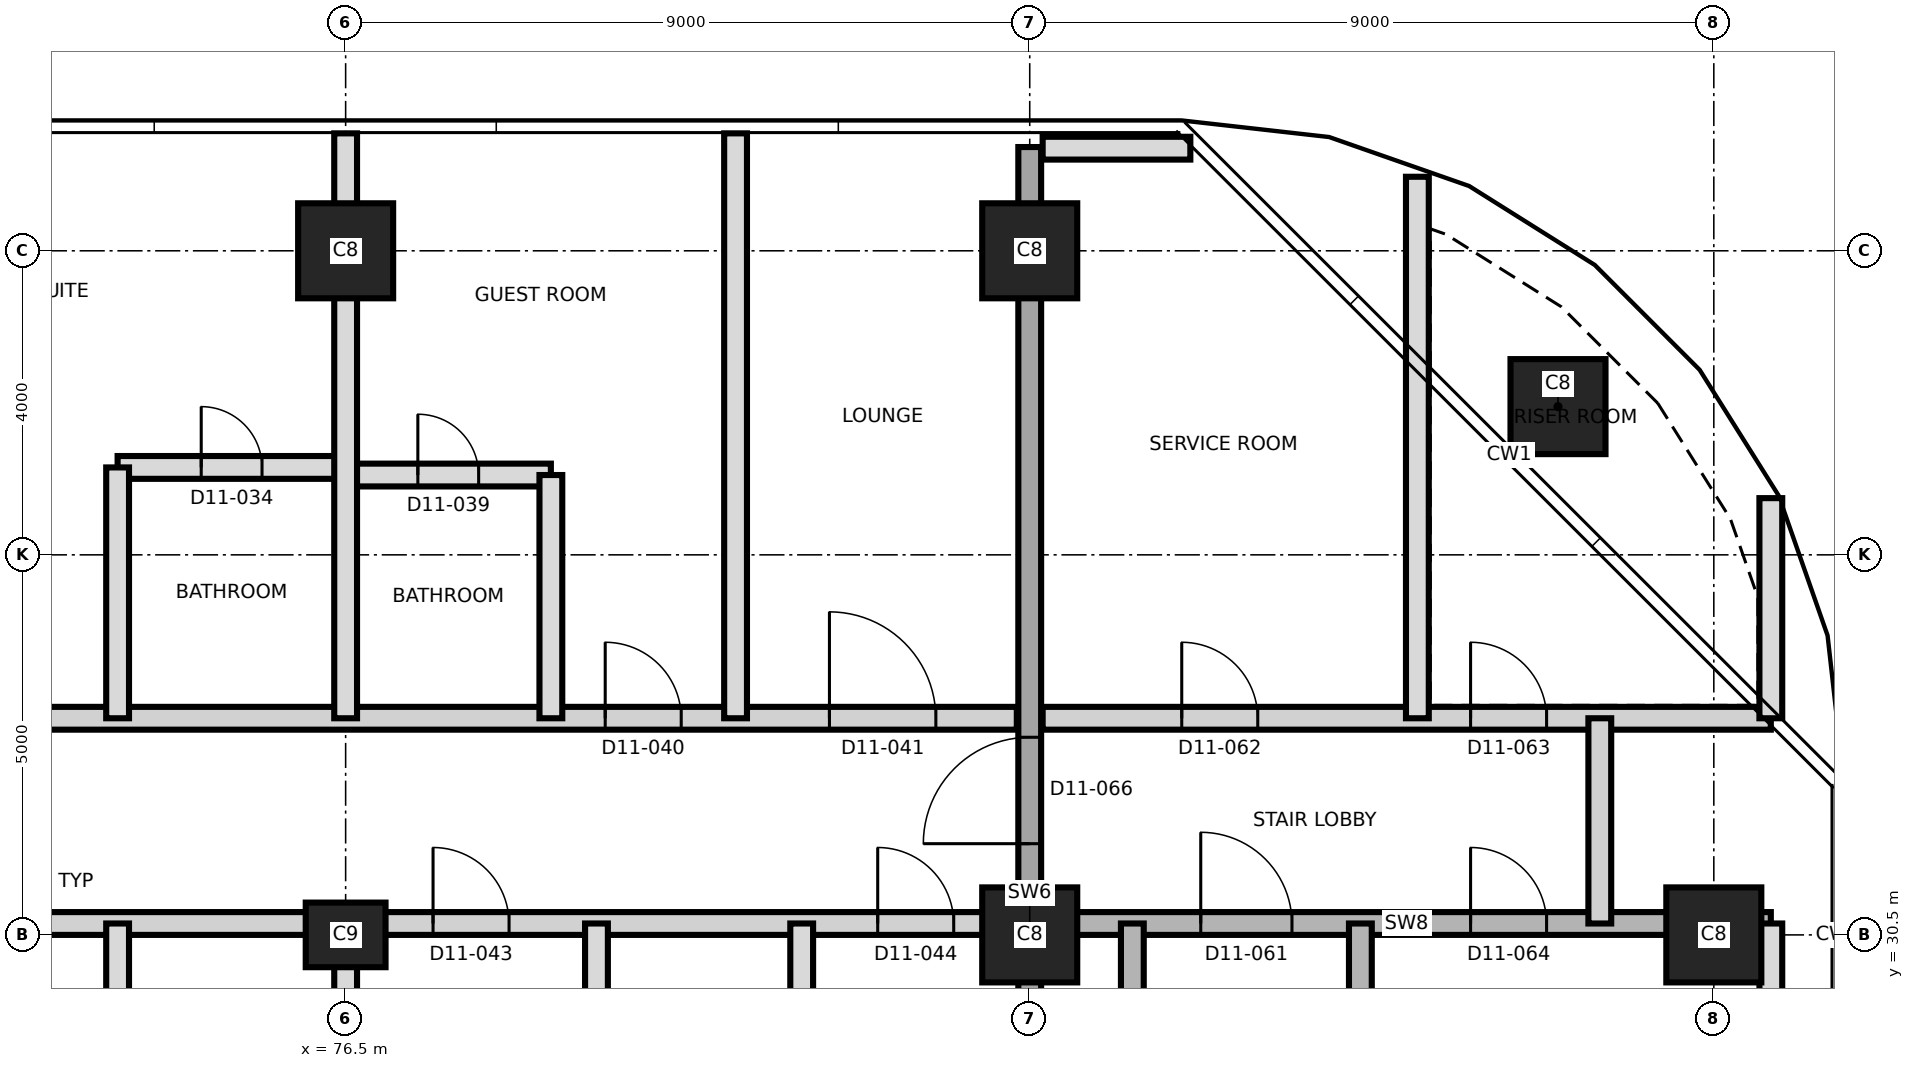
"""IFC4 building model, lengths in metres.
Left out: names, types, materials, properties, quantities, classifications, styles, units other than length and angle.
Written with IfcOpenShell. Run it as: python <this file> out.ifc"""

import sys

from ifc_helpers import new_model, si_unit, direction, frame, frame_2d, origin, origin_2d, place, context, subcontext, project, spatial, rectangle, extrude, element, fill, save


model = new_model("IFC4")
c1 = context("Model", 3, precision=1e-05, world=origin(), true_north=direction((0.0, 1.0)))
c2 = subcontext(c1, "Body", "Model", "MODEL_VIEW")
j1 = project(units=[si_unit("LENGTHUNIT", "METRE"), si_unit("PLANEANGLEUNIT", "RADIAN")], contexts=[c1])
p1 = place(None, origin())
s1 = spatial("IfcSite", under=j1, at=p1, CompositionType="ELEMENT")
p2 = place(p1, origin())
s2 = spatial("IfcBuilding", under=s1, at=p2, CompositionType="ELEMENT")
p3 = place(p2, frame((0.0, 0.0, 131.5)))
s3 = spatial("IfcBuildingStorey", under=s2, at=p3, CompositionType="ELEMENT", Elevation=131.5)
p4 = place(p3, frame((76.5, 30.5, 0.0), z_axis=(0.0, 0.0, 1.0), x_axis=(1.0, 0.0, 0.0)))
e1 = element("IfcColumn", 1, at=p4, inside=s3, PredefinedType="COLUMN", context=c2, shape_type="SweptSolid", body=[
    extrude(rectangle(XDim=1.05, YDim=0.85, at=origin_2d()), origin(), (0.0, 0.0, 1.0), 3.7),
])
for number, where, z_axis, x_axis in (
    (2, (85.5, 30.5, 0.0), (0.0, 0.0, 1.0), (1.0, 0.0, 0.0)),
    (3, (94.5, 30.5, 0.0), (0.0, 0.0, 1.0), (1.0, 0.0, 0.0)),
    (4, (92.45, 37.45, 0.0), (0.0, 0.0, 1.0), (1.0, 0.0, 0.0)),
    (5, (76.5, 39.5, 0.0), (0.0, 0.0, 1.0), (1.0, 0.0, 0.0)),
    (6, (85.5, 39.5, 0.0), (0.0, 0.0, 1.0), (1.0, 0.0, 0.0)),
):
    element("IfcColumn", number, at=place(p3, frame(where, z_axis=z_axis, x_axis=x_axis)), inside=s3, PredefinedType="COLUMN", context=c2, shape_type="SweptSolid", body=[
        extrude(rectangle(XDim=1.25, YDim=1.25, at=origin_2d()), origin(), (0.0, 0.0, 1.0), 3.7),
    ])
p5 = place(p3, frame((85.5, 20.135, 0.0), z_axis=(0.0, 0.0, 1.0), x_axis=(0.0, 1.0, 0.0)))
e7 = element("IfcWall", 7, at=p5, inside=s3, PredefinedType="SHEAR", context=c2, shape_type="SweptSolid", body=[
    extrude(rectangle(XDim=20.73, YDim=0.3, at=frame_2d((10.365, 0.0))), origin(), (0.0, 0.0, 1.0), 3.7),
])
p6 = place(p5, frame((11.565, 0.0, 0.0)))
e8 = element("IfcOpeningElement", 8, at=p6, cuts=e7, PredefinedType="OPENING", context=c2, shape_type="SweptSolid", body=[
    extrude(rectangle(XDim=1.4, YDim=2.1, at=frame_2d((0.7, 1.05))), frame((0.0, 0.16, 0.0), z_axis=(0.0, -1.0, 0.0), x_axis=(1.0, 0.0, 0.0)), (0.0, 0.0, 1.0), 0.32),
])
p7 = place(p3, frame((58.8, 30.65, 0.0), z_axis=(0.0, 0.0, 1.0), x_axis=(1.0, 0.0, 0.0)))
e9 = element("IfcWall", 9, at=p7, inside=s3, PredefinedType="PARTITIONING", context=c2, shape_type="SweptSolid", body=[
    extrude(rectangle(XDim=26.53, YDim=0.3, at=frame_2d((13.265, 0.0))), origin(), (0.0, 0.0, 1.0), 3.4),
])
p8 = place(p7, frame((3.115, 0.0, 0.0)))
e10 = element("IfcOpeningElement", 10, at=p8, cuts=e9, PredefinedType="OPENING", context=c2, shape_type="SweptSolid", body=[
    extrude(rectangle(XDim=1.0, YDim=2.1, at=frame_2d((0.5, 1.05))), frame((0.0, 0.16, 0.0), z_axis=(0.0, -1.0, 0.0), x_axis=(1.0, 0.0, 0.0)), (0.0, 0.0, 1.0), 0.32),
])
p9 = place(p7, frame((6.065, 0.0, 0.0)))
e11 = element("IfcOpeningElement", 11, at=p9, cuts=e9, PredefinedType="OPENING", context=c2, shape_type="SweptSolid", body=[
    extrude(rectangle(XDim=1.4, YDim=2.1, at=frame_2d((0.7, 1.05))), frame((0.0, 0.16, 0.0), z_axis=(0.0, -1.0, 0.0), x_axis=(1.0, 0.0, 0.0)), (0.0, 0.0, 1.0), 0.32),
])
p10 = place(p7, frame((12.7, 0.0, 0.0)))
e12 = element("IfcOpeningElement", 12, at=p10, cuts=e9, PredefinedType="OPENING", context=c2, shape_type="SweptSolid", body=[
    extrude(rectangle(XDim=1.0, YDim=2.4, at=frame_2d((0.5, 1.2))), frame((0.0, 0.16, 0.0), z_axis=(0.0, -1.0, 0.0), x_axis=(1.0, 0.0, 0.0)), (0.0, 0.0, 1.0), 0.32),
])
p11 = place(p7, frame((18.85, 0.0, 0.0)))
e13 = element("IfcOpeningElement", 13, at=p11, cuts=e9, PredefinedType="OPENING", context=c2, shape_type="SweptSolid", body=[
    extrude(rectangle(XDim=1.0, YDim=2.1, at=frame_2d((0.5, 1.05))), frame((0.0, 0.16, 0.0), z_axis=(0.0, -1.0, 0.0), x_axis=(1.0, 0.0, 0.0)), (0.0, 0.0, 1.0), 0.32),
])
p12 = place(p7, frame((24.7, 0.0, 0.0)))
e14 = element("IfcOpeningElement", 14, at=p12, cuts=e9, PredefinedType="OPENING", context=c2, shape_type="SweptSolid", body=[
    extrude(rectangle(XDim=1.0, YDim=2.1, at=frame_2d((0.5, 1.05))), frame((0.0, 0.16, 0.0), z_axis=(0.0, -1.0, 0.0), x_axis=(1.0, 0.0, 0.0)), (0.0, 0.0, 1.0), 0.32),
])
p13 = place(p3, frame((85.67, 30.65, 0.0), z_axis=(0.0, 0.0, 1.0), x_axis=(1.0, 0.0, 0.0)))
e15 = element("IfcWall", 15, at=p13, inside=s3, PredefinedType="SHEAR", context=c2, shape_type="SweptSolid", body=[
    extrude(rectangle(XDim=9.58, YDim=0.3, at=frame_2d((4.79, 0.0))), origin(), (0.0, 0.0, 1.0), 3.4),
])
p14 = place(p13, frame((2.08, 0.0, 0.0)))
e16 = element("IfcOpeningElement", 16, at=p14, cuts=e15, PredefinedType="OPENING", context=c2, shape_type="SweptSolid", body=[
    extrude(rectangle(XDim=1.2, YDim=2.1, at=frame_2d((0.6, 1.05))), frame((0.0, 0.16, 0.0), z_axis=(0.0, -1.0, 0.0), x_axis=(1.0, 0.0, 0.0)), (0.0, 0.0, 1.0), 0.32),
])
p15 = place(p13, frame((5.63, 0.0, 0.0)))
e17 = element("IfcOpeningElement", 17, at=p15, cuts=e15, PredefinedType="OPENING", context=c2, shape_type="SweptSolid", body=[
    extrude(rectangle(XDim=1.0, YDim=2.1, at=frame_2d((0.5, 1.05))), frame((0.0, 0.16, 0.0), z_axis=(0.0, -1.0, 0.0), x_axis=(1.0, 0.0, 0.0)), (0.0, 0.0, 1.0), 0.32),
])
p16 = place(p3, frame((58.8, 33.35, 0.0), z_axis=(0.0, 0.0, 1.0), x_axis=(1.0, 0.0, 0.0)))
e18 = element("IfcWall", 18, at=p16, inside=s3, PredefinedType="PARTITIONING", context=c2, shape_type="SweptSolid", body=[
    extrude(rectangle(XDim=26.53, YDim=0.3, at=frame_2d((13.265, 0.0))), origin(), (0.0, 0.0, 1.0), 3.4),
])
p17 = place(p16, frame((0.835, 0.0, 0.0)))
e19 = element("IfcOpeningElement", 19, at=p17, cuts=e18, PredefinedType="OPENING", context=c2, shape_type="SweptSolid", body=[
    extrude(rectangle(XDim=1.2, YDim=2.1, at=frame_2d((0.6, 1.05))), frame((0.0, 0.16, 0.0), z_axis=(0.0, -1.0, 0.0), x_axis=(1.0, 0.0, 0.0)), (0.0, 0.0, 1.0), 0.32),
])
p18 = place(p16, frame((4.085, 0.0, 0.0)))
e20 = element("IfcOpeningElement", 20, at=p18, cuts=e18, PredefinedType="OPENING", context=c2, shape_type="SweptSolid", body=[
    extrude(rectangle(XDim=1.0, YDim=2.1, at=frame_2d((0.5, 1.05))), frame((0.0, 0.16, 0.0), z_axis=(0.0, -1.0, 0.0), x_axis=(1.0, 0.0, 0.0)), (0.0, 0.0, 1.0), 0.32),
])
p19 = place(p16, frame((12.7, 0.0, 0.0)))
e21 = element("IfcOpeningElement", 21, at=p19, cuts=e18, PredefinedType="OPENING", context=c2, shape_type="SweptSolid", body=[
    extrude(rectangle(XDim=1.0, YDim=2.4, at=frame_2d((0.5, 1.2))), frame((0.0, 0.16, 0.0), z_axis=(0.0, -1.0, 0.0), x_axis=(1.0, 0.0, 0.0)), (0.0, 0.0, 1.0), 0.32),
])
p20 = place(p16, frame((21.115, 0.0, 0.0)))
e22 = element("IfcOpeningElement", 22, at=p20, cuts=e18, PredefinedType="OPENING", context=c2, shape_type="SweptSolid", body=[
    extrude(rectangle(XDim=1.0, YDim=2.1, at=frame_2d((0.5, 1.05))), frame((0.0, 0.16, 0.0), z_axis=(0.0, -1.0, 0.0), x_axis=(1.0, 0.0, 0.0)), (0.0, 0.0, 1.0), 0.32),
])
p21 = place(p16, frame((24.065, 0.0, 0.0)))
e23 = element("IfcOpeningElement", 23, at=p21, cuts=e18, PredefinedType="OPENING", context=c2, shape_type="SweptSolid", body=[
    extrude(rectangle(XDim=1.4, YDim=2.1, at=frame_2d((0.7, 1.05))), frame((0.0, 0.16, 0.0), z_axis=(0.0, -1.0, 0.0), x_axis=(1.0, 0.0, 0.0)), (0.0, 0.0, 1.0), 0.32),
])
p22 = place(p3, frame((85.67, 33.35, 0.0), z_axis=(0.0, 0.0, 1.0), x_axis=(1.0, 0.0, 0.0)))
e24 = element("IfcWall", 24, at=p22, inside=s3, PredefinedType="PARTITIONING", context=c2, shape_type="SweptSolid", body=[
    extrude(rectangle(XDim=9.58, YDim=0.3, at=frame_2d((4.79, 0.0))), origin(), (0.0, 0.0, 1.0), 3.4),
])
p23 = place(p22, frame((1.83, 0.0, 0.0)))
e25 = element("IfcOpeningElement", 25, at=p23, cuts=e24, PredefinedType="OPENING", context=c2, shape_type="SweptSolid", body=[
    extrude(rectangle(XDim=1.0, YDim=2.1, at=frame_2d((0.5, 1.05))), frame((0.0, 0.16, 0.0), z_axis=(0.0, -1.0, 0.0), x_axis=(1.0, 0.0, 0.0)), (0.0, 0.0, 1.0), 0.32),
])
p24 = place(p22, frame((5.63, 0.0, 0.0)))
e26 = element("IfcOpeningElement", 26, at=p24, cuts=e24, PredefinedType="OPENING", context=c2, shape_type="SweptSolid", body=[
    extrude(rectangle(XDim=1.0, YDim=2.1, at=frame_2d((0.5, 1.05))), frame((0.0, 0.16, 0.0), z_axis=(0.0, -1.0, 0.0), x_axis=(1.0, 0.0, 0.0)), (0.0, 0.0, 1.0), 0.32),
])
p25 = place(p3, frame((76.5, 36.55, 0.0), z_axis=(0.0, 0.0, 1.0), x_axis=(1.0, 0.0, 0.0)))
e27 = element("IfcWall", 27, at=p25, inside=s3, PredefinedType="PARTITIONING", context=c2, shape_type="SweptSolid", body=[
    extrude(rectangle(XDim=2.7, YDim=0.3, at=frame_2d((1.35, 0.0))), origin(), (0.0, 0.0, 1.0), 3.4),
])
p26 = place(p25, frame((0.95, 0.0, 0.0)))
e28 = element("IfcOpeningElement", 28, at=p26, cuts=e27, PredefinedType="OPENING", context=c2, shape_type="SweptSolid", body=[
    extrude(rectangle(XDim=0.8, YDim=2.1, at=frame_2d((0.4, 1.05))), frame((0.0, 0.16, 0.0), z_axis=(0.0, -1.0, 0.0), x_axis=(1.0, 0.0, 0.0)), (0.0, 0.0, 1.0), 0.32),
])
p27 = place(p3, frame((73.5, 36.65, 0.0), z_axis=(0.0, 0.0, 1.0), x_axis=(1.0, 0.0, 0.0)))
e29 = element("IfcWall", 29, at=p27, inside=s3, PredefinedType="PARTITIONING", context=c2, shape_type="SweptSolid", body=[
    extrude(rectangle(XDim=3.0, YDim=0.3, at=frame_2d((1.5, 0.0))), origin(), (0.0, 0.0, 1.0), 3.4),
])
p28 = place(p27, frame((1.1, 0.0, 0.0)))
e30 = element("IfcOpeningElement", 30, at=p28, cuts=e29, PredefinedType="OPENING", context=c2, shape_type="SweptSolid", body=[
    extrude(rectangle(XDim=0.8, YDim=2.1, at=frame_2d((0.4, 1.05))), frame((0.0, 0.16, 0.0), z_axis=(0.0, -1.0, 0.0), x_axis=(1.0, 0.0, 0.0)), (0.0, 0.0, 1.0), 0.32),
])
p29 = place(p3, frame((85.67, 40.85, 0.0), z_axis=(0.0, 0.0, 1.0), x_axis=(1.0, 0.0, 0.0)))
e31 = element("IfcWall", 31, at=p29, inside=s3, PredefinedType="PARTITIONING", context=c2, shape_type="SweptSolid", body=[
    extrude(rectangle(XDim=1.943, YDim=0.3, at=frame_2d((0.972, 0.0))), origin(), (0.0, 0.0, 1.0), 3.35),
])
for number, where, z_axis, x_axis in (
    (32, (73.5, 27.35, 0.0), (0.0, 0.0, 1.0), (0.0, 1.0, 0.0)),
    (33, (73.5, 33.35, 0.0), (0.0, 0.0, 1.0), (0.0, 1.0, 0.0)),
):
    element("IfcWall", number, at=place(p3, frame(where, z_axis=z_axis, x_axis=x_axis)), inside=s3, PredefinedType="PARTITIONING", context=c2, shape_type="SweptSolid", body=[
        extrude(rectangle(XDim=3.3, YDim=0.3, at=frame_2d((1.65, 0.0))), origin(), (0.0, 0.0, 1.0), 3.4),
    ])
p30 = place(p3, frame((76.5, 20.135, 0.0), z_axis=(0.0, 0.0, 1.0), x_axis=(0.0, 1.0, 0.0)))
e34 = element("IfcWall", 34, at=p30, inside=s3, PredefinedType="PARTITIONING", context=c2, shape_type="SweptSolid", body=[
    extrude(rectangle(XDim=10.515, YDim=0.3, at=frame_2d((5.257, 0.0))), origin(), (0.0, 0.0, 1.0), 3.35),
])
p31 = place(p3, frame((76.5, 33.35, 0.0), z_axis=(0.0, 0.0, 1.0), x_axis=(0.0, 1.0, 0.0)))
e35 = element("IfcWall", 35, at=p31, inside=s3, PredefinedType="PARTITIONING", context=c2, shape_type="SweptSolid", body=[
    extrude(rectangle(XDim=7.695, YDim=0.3, at=frame_2d((3.847, 0.0))), origin(), (0.0, 0.0, 1.0), 3.35),
])
for number, where, z_axis, x_axis in (
    (36, (79.2, 33.35, 0.0), (0.0, 0.0, 1.0), (0.0, 1.0, 0.0)),
    (37, (79.8, 27.45, 0.0), (0.0, 0.0, 1.0), (0.0, 1.0, 0.0)),
):
    element("IfcWall", number, at=place(p3, frame(where, z_axis=z_axis, x_axis=x_axis)), inside=s3, PredefinedType="PARTITIONING", context=c2, shape_type="SweptSolid", body=[
        extrude(rectangle(XDim=3.2, YDim=0.3, at=frame_2d((1.6, 0.0))), origin(), (0.0, 0.0, 1.0), 3.4),
    ])
p32 = place(p3, frame((81.63, 33.35, 0.0), z_axis=(0.0, 0.0, 1.0), x_axis=(0.0, 1.0, 0.0)))
e38 = element("IfcWall", 38, at=p32, inside=s3, PredefinedType="PARTITIONING", context=c2, shape_type="SweptSolid", body=[
    extrude(rectangle(XDim=7.695, YDim=0.3, at=frame_2d((3.847, 0.0))), origin(), (0.0, 0.0, 1.0), 3.35),
])
p33 = place(p3, frame((82.5, 20.135, 0.0), z_axis=(0.0, 0.0, 1.0), x_axis=(0.0, 1.0, 0.0)))
e39 = element("IfcWall", 39, at=p33, inside=s3, PredefinedType="PARTITIONING", context=c2, shape_type="SweptSolid", body=[
    extrude(rectangle(XDim=10.515, YDim=0.3, at=frame_2d((5.257, 0.0))), origin(), (0.0, 0.0, 1.0), 3.35),
])
for number, where, z_axis, x_axis in (
    (40, (86.85, 21.8, 0.0), (0.0, 0.0, 1.0), (0.0, 1.0, 0.0)),
    (41, (89.85, 21.8, 0.0), (0.0, 0.0, 1.0), (0.0, 1.0, 0.0)),
):
    element("IfcWall", number, at=place(p3, frame(where, z_axis=z_axis, x_axis=x_axis)), inside=s3, PredefinedType="SHEAR", context=c2, shape_type="SweptSolid", body=[
        extrude(rectangle(XDim=8.85, YDim=0.3, at=frame_2d((4.425, 0.0))), origin(), (0.0, 0.0, 1.0), 3.4),
    ])
p34 = place(p3, frame((90.6, 33.35, 0.0), z_axis=(0.0, 0.0, 1.0), x_axis=(0.0, 1.0, 0.0)))
e42 = element("IfcWall", 42, at=p34, inside=s3, PredefinedType="PARTITIONING", context=c2, shape_type="SweptSolid", body=[
    extrude(rectangle(XDim=7.124, YDim=0.3, at=frame_2d((3.562, 0.0))), origin(), (0.0, 0.0, 1.0), 3.35),
])
p35 = place(p3, frame((93.0, 30.65, 0.0), z_axis=(0.0, 0.0, 1.0), x_axis=(0.0, 1.0, 0.0)))
e43 = element("IfcWall", 43, at=p35, inside=s3, PredefinedType="PARTITIONING", context=c2, shape_type="SweptSolid", body=[
    extrude(rectangle(XDim=2.7, YDim=0.3, at=frame_2d((1.35, 0.0))), origin(), (0.0, 0.0, 1.0), 3.4),
])
p36 = place(p3, frame((95.25, 24.754, 0.0), z_axis=(0.0, 0.0, 1.0), x_axis=(0.0, 1.0, 0.0)))
e44 = element("IfcWall", 44, at=p36, inside=s3, PredefinedType="PARTITIONING", context=c2, shape_type="SweptSolid", body=[
    extrude(rectangle(XDim=5.896, YDim=0.3, at=frame_2d((2.948, 0.0))), origin(), (0.0, 0.0, 1.0), 3.35),
])
p37 = place(p3, frame((95.25, 33.35, 0.0), z_axis=(0.0, 0.0, 1.0), x_axis=(0.0, 1.0, 0.0)))
e45 = element("IfcWall", 45, at=p37, inside=s3, PredefinedType="PARTITIONING", context=c2, shape_type="SweptSolid", body=[
    extrude(rectangle(XDim=2.896, YDim=0.3, at=frame_2d((1.448, 0.0))), origin(), (0.0, 0.0, 1.0), 3.35),
])
p38 = place(p28, origin())
e46 = element("IfcDoor", 46, at=p38, inside=s3, OperationType="SINGLE_SWING_RIGHT", PredefinedType="DOOR", context=c2, shape_type="SweptSolid", body=[
    extrude(rectangle(XDim=0.8, YDim=2.1, at=frame_2d((0.4, 1.05))), frame((0.0, 0.025, 0.0), z_axis=(0.0, -1.0, 0.0), x_axis=(1.0, 0.0, 0.0)), (0.0, 0.0, 1.0), 0.05),
])
fill(e30, e46)
p39 = place(p26, origin())
e47 = element("IfcDoor", 47, at=p39, inside=s3, OperationType="SINGLE_SWING_LEFT", PredefinedType="DOOR", context=c2, shape_type="SweptSolid", body=[
    extrude(rectangle(XDim=0.8, YDim=2.1, at=frame_2d((0.4, 1.05))), frame((0.0, 0.025, 0.0), z_axis=(0.0, -1.0, 0.0), x_axis=(1.0, 0.0, 0.0)), (0.0, 0.0, 1.0), 0.05),
])
fill(e28, e47)
p40 = place(p20, origin())
e48 = element("IfcDoor", 48, at=p40, inside=s3, OperationType="SINGLE_SWING_LEFT", PredefinedType="DOOR", context=c2, shape_type="SweptSolid", body=[
    extrude(rectangle(XDim=1.0, YDim=2.1, at=frame_2d((0.5, 1.05))), frame((0.0, 0.025, 0.0), z_axis=(0.0, -1.0, 0.0), x_axis=(1.0, 0.0, 0.0)), (0.0, 0.0, 1.0), 0.05),
])
fill(e22, e48)
p41 = place(p21, origin())
e49 = element("IfcDoor", 49, at=p41, inside=s3, OperationType="SINGLE_SWING_RIGHT", PredefinedType="DOOR", context=c2, shape_type="SweptSolid", body=[
    extrude(rectangle(XDim=1.4, YDim=2.1, at=frame_2d((0.7, 1.05))), frame((0.0, 0.025, 0.0), z_axis=(0.0, -1.0, 0.0), x_axis=(1.0, 0.0, 0.0)), (0.0, 0.0, 1.0), 0.05),
])
fill(e23, e49)
p42 = place(p11, origin())
e50 = element("IfcDoor", 50, at=p42, inside=s3, OperationType="SINGLE_SWING_LEFT", PredefinedType="DOOR", context=c2, shape_type="SweptSolid", body=[
    extrude(rectangle(XDim=1.0, YDim=2.1, at=frame_2d((0.5, 1.05))), frame((0.0, 0.025, 0.0), z_axis=(0.0, -1.0, 0.0), x_axis=(1.0, 0.0, 0.0)), (0.0, 0.0, 1.0), 0.05),
])
fill(e13, e50)
p43 = place(p12, origin())
e51 = element("IfcDoor", 51, at=p43, inside=s3, OperationType="SINGLE_SWING_RIGHT", PredefinedType="DOOR", context=c2, shape_type="SweptSolid", body=[
    extrude(rectangle(XDim=1.0, YDim=2.1, at=frame_2d((0.5, 1.05))), frame((0.0, 0.025, 0.0), z_axis=(0.0, -1.0, 0.0), x_axis=(1.0, 0.0, 0.0)), (0.0, 0.0, 1.0), 0.05),
])
fill(e14, e51)
p44 = place(p14, origin())
e52 = element("IfcDoor", 52, at=p44, inside=s3, OperationType="SINGLE_SWING_LEFT", PredefinedType="DOOR", context=c2, shape_type="SweptSolid", body=[
    extrude(rectangle(XDim=1.2, YDim=2.1, at=frame_2d((0.6, 1.05))), frame((0.0, 0.025, 0.0), z_axis=(0.0, -1.0, 0.0), x_axis=(1.0, 0.0, 0.0)), (0.0, 0.0, 1.0), 0.05),
])
fill(e16, e52)
p45 = place(p23, origin())
e53 = element("IfcDoor", 53, at=p45, inside=s3, OperationType="SINGLE_SWING_LEFT", PredefinedType="DOOR", context=c2, shape_type="SweptSolid", body=[
    extrude(rectangle(XDim=1.0, YDim=2.1, at=frame_2d((0.5, 1.05))), frame((0.0, 0.025, 0.0), z_axis=(0.0, -1.0, 0.0), x_axis=(1.0, 0.0, 0.0)), (0.0, 0.0, 1.0), 0.05),
])
fill(e25, e53)
p46 = place(p24, origin())
e54 = element("IfcDoor", 54, at=p46, inside=s3, OperationType="SINGLE_SWING_RIGHT", PredefinedType="DOOR", context=c2, shape_type="SweptSolid", body=[
    extrude(rectangle(XDim=1.0, YDim=2.1, at=frame_2d((0.5, 1.05))), frame((0.0, 0.025, 0.0), z_axis=(0.0, -1.0, 0.0), x_axis=(1.0, 0.0, 0.0)), (0.0, 0.0, 1.0), 0.05),
])
fill(e26, e54)
p47 = place(p15, origin())
e55 = element("IfcDoor", 55, at=p47, inside=s3, OperationType="SINGLE_SWING_LEFT", PredefinedType="DOOR", context=c2, shape_type="SweptSolid", body=[
    extrude(rectangle(XDim=1.0, YDim=2.1, at=frame_2d((0.5, 1.05))), frame((0.0, 0.025, 0.0), z_axis=(0.0, -1.0, 0.0), x_axis=(1.0, 0.0, 0.0)), (0.0, 0.0, 1.0), 0.05),
])
fill(e17, e55)
p48 = place(p6, origin())
e56 = element("IfcDoor", 56, at=p48, inside=s3, OperationType="SINGLE_SWING_RIGHT", PredefinedType="DOOR", context=c2, shape_type="SweptSolid", body=[
    extrude(rectangle(XDim=1.4, YDim=2.1, at=frame_2d((0.7, 1.05))), frame((0.0, 0.025, 0.0), z_axis=(0.0, -1.0, 0.0), x_axis=(1.0, 0.0, 0.0)), (0.0, 0.0, 1.0), 0.05),
])
fill(e8, e56)
save(model, sys.argv[1])
